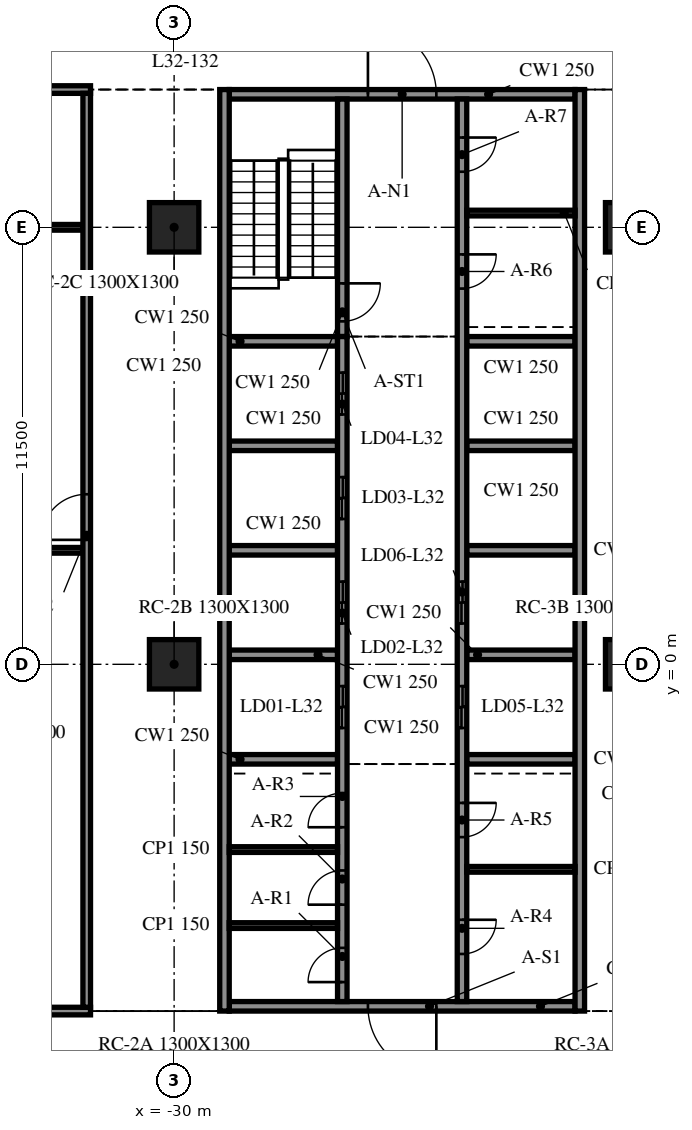
"""IFC4 building model, lengths in metres.
Left out: names, types, materials, properties, quantities, classifications, styles, units other than length and angle.
Written with IfcOpenShell. Run it as: python <this file> out.ifc"""

import sys

from ifc_helpers import new_model, si_unit, direction, frame, frame_2d, origin, origin_2d, place, context, subcontext, project, spatial, rectangle, extrude, element, fill, save


model = new_model("IFC4")
c1 = context("Model", 3, precision=1e-05, world=origin(), true_north=direction((0.0, 1.0)))
c2 = subcontext(c1, "Body", "Model", "MODEL_VIEW")
j1 = project(units=[si_unit("LENGTHUNIT", "METRE"), si_unit("PLANEANGLEUNIT", "RADIAN")], contexts=[c1])
p1 = place(None, origin())
s1 = spatial("IfcSite", under=j1, at=p1, CompositionType="ELEMENT")
p2 = place(p1, origin())
s2 = spatial("IfcBuilding", under=s1, at=p2, CompositionType="ELEMENT")
p3 = place(p2, frame((0.0, 0.0, 138.4)))
s3 = spatial("IfcBuildingStorey", under=s2, at=p3, CompositionType="ELEMENT", Elevation=138.4)
for number, where, z_axis, x_axis in (
    (1, (-30.0, 0.0, -0.34), (0.0, 0.0, 1.0), (1.0, 0.0, 0.0)),
    (2, (-30.0, 11.5, -0.34), (0.0, 0.0, 1.0), (1.0, 0.0, 0.0)),
    (3, (-18.0, 0.0, -0.34), (0.0, 0.0, 1.0), (1.0, 0.0, 0.0)),
    (4, (-18.0, 11.5, -0.34), (0.0, 0.0, 1.0), (1.0, 0.0, 0.0)),
):
    element("IfcColumn", number, at=place(p3, frame(where, z_axis=z_axis, x_axis=x_axis)), inside=s3, PredefinedType="COLUMN", context=c2, shape_type="SweptSolid", body=[
        extrude(rectangle(XDim=1.3, YDim=1.3, at=origin_2d()), origin(), (0.0, 0.0, 1.0), 4.1),
    ])
for number, where, z_axis, x_axis in (
    (5, (-28.675, 15.125, 0.0), (0.0, 0.0, 1.0), (0.0, -1.0, 0.0)),
    (6, (-19.325, -9.125, 0.0), (0.0, 0.0, 1.0), (0.0, 1.0, 0.0)),
):
    element("IfcWall", number, at=place(p3, frame(where, z_axis=z_axis, x_axis=x_axis)), inside=s3, PredefinedType="SOLIDWALL", context=c2, shape_type="SweptSolid", body=[
        extrude(rectangle(XDim=24.25, YDim=0.25, at=frame_2d((12.125, 0.0))), origin(), (0.0, 0.0, 1.0), 3.76),
    ])
p4 = place(p3, frame((-19.45, -9.0, 0.0), z_axis=(0.0, 0.0, 1.0), x_axis=(-1.0, 0.0, 0.0)))
e7 = element("IfcWall", 7, at=p4, inside=s3, PredefinedType="SOLIDWALL", context=c2, shape_type="SweptSolid", body=[
    extrude(rectangle(XDim=9.1, YDim=0.25, at=frame_2d((4.55, 0.0))), origin(), (0.0, 0.0, 1.0), 3.76),
])
p5 = place(p4, frame((3.65, 0.0, 0.0)))
e8 = element("IfcOpeningElement", 8, at=p5, cuts=e7, PredefinedType="OPENING", context=c2, shape_type="SweptSolid", body=[
    extrude(rectangle(XDim=1.8, YDim=2.1, at=frame_2d((0.9, 1.05))), frame((0.0, 0.135, 0.0), z_axis=(0.0, -1.0, 0.0), x_axis=(1.0, 0.0, 0.0)), (0.0, 0.0, 1.0), 0.27),
])
p6 = place(p3, frame((-28.55, 15.0, 0.0), z_axis=(0.0, 0.0, 1.0), x_axis=(1.0, 0.0, 0.0)))
e9 = element("IfcWall", 9, at=p6, inside=s3, PredefinedType="SOLIDWALL", context=c2, shape_type="SweptSolid", body=[
    extrude(rectangle(XDim=9.1, YDim=0.25, at=frame_2d((4.55, 0.0))), origin(), (0.0, 0.0, 1.0), 3.76),
])
p7 = place(p6, frame((3.65, 0.0, 0.0)))
e10 = element("IfcOpeningElement", 10, at=p7, cuts=e9, PredefinedType="OPENING", context=c2, shape_type="SweptSolid", body=[
    extrude(rectangle(XDim=1.8, YDim=2.1, at=frame_2d((0.9, 1.05))), frame((0.0, 0.135, 0.0), z_axis=(0.0, -1.0, 0.0), x_axis=(1.0, 0.0, 0.0)), (0.0, 0.0, 1.0), 0.27),
])
p8 = place(p3, frame((-25.575, -8.875, 0.0), z_axis=(0.0, 0.0, 1.0), x_axis=(0.0, 1.0, 0.0)))
e11 = element("IfcWall", 11, at=p8, inside=s3, PredefinedType="SOLIDWALL", context=c2, shape_type="SweptSolid", body=[
    extrude(rectangle(XDim=17.5, YDim=0.25, at=frame_2d((8.75, 0.0))), origin(), (0.0, 0.0, 1.0), 3.76),
])
p9 = place(p8, frame((7.2, 0.0, 0.0)))
e12 = element("IfcOpeningElement", 12, at=p9, cuts=e11, PredefinedType="OPENING", context=c2, shape_type="SweptSolid", body=[
    extrude(rectangle(XDim=1.1, YDim=2.1, at=frame_2d((0.55, 1.05))), frame((0.0, 0.135, 0.0), z_axis=(0.0, -1.0, 0.0), x_axis=(1.0, 0.0, 0.0)), (0.0, 0.0, 1.0), 0.27),
])
p10 = place(p8, frame((9.95, 0.0, 0.0)))
e13 = element("IfcOpeningElement", 13, at=p10, cuts=e11, PredefinedType="OPENING", context=c2, shape_type="SweptSolid", body=[
    extrude(rectangle(XDim=1.1, YDim=2.1, at=frame_2d((0.55, 1.05))), frame((0.0, 0.135, 0.0), z_axis=(0.0, -1.0, 0.0), x_axis=(1.0, 0.0, 0.0)), (0.0, 0.0, 1.0), 0.27),
])
p11 = place(p8, frame((12.7, 0.0, 0.0)))
e14 = element("IfcOpeningElement", 14, at=p11, cuts=e11, PredefinedType="OPENING", context=c2, shape_type="SweptSolid", body=[
    extrude(rectangle(XDim=1.1, YDim=2.1, at=frame_2d((0.55, 1.05))), frame((0.0, 0.135, 0.0), z_axis=(0.0, -1.0, 0.0), x_axis=(1.0, 0.0, 0.0)), (0.0, 0.0, 1.0), 0.27),
])
p12 = place(p8, frame((15.45, 0.0, 0.0)))
e15 = element("IfcOpeningElement", 15, at=p12, cuts=e11, PredefinedType="OPENING", context=c2, shape_type="SweptSolid", body=[
    extrude(rectangle(XDim=1.1, YDim=2.1, at=frame_2d((0.55, 1.05))), frame((0.0, 0.135, 0.0), z_axis=(0.0, -1.0, 0.0), x_axis=(1.0, 0.0, 0.0)), (0.0, 0.0, 1.0), 0.27),
])
p13 = place(p8, frame((0.512, 0.0, 0.0)))
e16 = element("IfcOpeningElement", 16, at=p13, cuts=e11, PredefinedType="OPENING", context=c2, shape_type="SweptSolid", body=[
    extrude(rectangle(XDim=0.9, YDim=2.1, at=frame_2d((0.45, 1.05))), frame((0.0, 0.135, 0.0), z_axis=(0.0, -1.0, 0.0), x_axis=(1.0, 0.0, 0.0)), (0.0, 0.0, 1.0), 0.27),
])
p14 = place(p8, frame((2.55, 0.0, 0.0)))
e17 = element("IfcOpeningElement", 17, at=p14, cuts=e11, PredefinedType="OPENING", context=c2, shape_type="SweptSolid", body=[
    extrude(rectangle(XDim=0.9, YDim=2.1, at=frame_2d((0.45, 1.05))), frame((0.0, 0.135, 0.0), z_axis=(0.0, -1.0, 0.0), x_axis=(1.0, 0.0, 0.0)), (0.0, 0.0, 1.0), 0.27),
])
p15 = place(p8, frame((4.587, 0.0, 0.0)))
e18 = element("IfcOpeningElement", 18, at=p15, cuts=e11, PredefinedType="OPENING", context=c2, shape_type="SweptSolid", body=[
    extrude(rectangle(XDim=0.9, YDim=2.1, at=frame_2d((0.45, 1.05))), frame((0.0, 0.135, 0.0), z_axis=(0.0, -1.0, 0.0), x_axis=(1.0, 0.0, 0.0)), (0.0, 0.0, 1.0), 0.27),
])
p16 = place(p3, frame((-25.575, 14.875, 0.0), z_axis=(0.0, 0.0, 1.0), x_axis=(0.0, -1.0, 0.0)))
e19 = element("IfcWall", 19, at=p16, inside=s3, PredefinedType="SOLIDWALL", context=c2, shape_type="SweptSolid", body=[
    extrude(rectangle(XDim=6.25, YDim=0.25, at=frame_2d((3.125, 0.0))), origin(), (0.0, 0.0, 1.0), 3.76),
])
p17 = place(p16, frame((4.85, 0.0, 0.0)))
e20 = element("IfcOpeningElement", 20, at=p17, cuts=e19, PredefinedType="OPENING", context=c2, shape_type="SweptSolid", body=[
    extrude(rectangle(XDim=1.0, YDim=2.1, at=frame_2d((0.5, 1.05))), frame((0.0, 0.135, 0.0), z_axis=(0.0, -1.0, 0.0), x_axis=(1.0, 0.0, 0.0)), (0.0, 0.0, 1.0), 0.27),
])
p18 = place(p3, frame((-22.425, 14.875, 0.0), z_axis=(0.0, 0.0, 1.0), x_axis=(0.0, -1.0, 0.0)))
e21 = element("IfcWall", 21, at=p18, inside=s3, PredefinedType="SOLIDWALL", context=c2, shape_type="SweptSolid", body=[
    extrude(rectangle(XDim=23.75, YDim=0.25, at=frame_2d((11.875, 0.0))), origin(), (0.0, 0.0, 1.0), 3.76),
])
p19 = place(p18, frame((15.45, 0.0, 0.0)))
e22 = element("IfcOpeningElement", 22, at=p19, cuts=e21, PredefinedType="OPENING", context=c2, shape_type="SweptSolid", body=[
    extrude(rectangle(XDim=1.1, YDim=2.1, at=frame_2d((0.55, 1.05))), frame((0.0, 0.135, 0.0), z_axis=(0.0, -1.0, 0.0), x_axis=(1.0, 0.0, 0.0)), (0.0, 0.0, 1.0), 0.27),
])
p20 = place(p18, frame((12.7, 0.0, 0.0)))
e23 = element("IfcOpeningElement", 23, at=p20, cuts=e21, PredefinedType="OPENING", context=c2, shape_type="SweptSolid", body=[
    extrude(rectangle(XDim=1.1, YDim=2.1, at=frame_2d((0.55, 1.05))), frame((0.0, 0.135, 0.0), z_axis=(0.0, -1.0, 0.0), x_axis=(1.0, 0.0, 0.0)), (0.0, 0.0, 1.0), 0.27),
])
p21 = place(p18, frame((21.597, 0.0, 0.0)))
e24 = element("IfcOpeningElement", 24, at=p21, cuts=e21, PredefinedType="OPENING", context=c2, shape_type="SweptSolid", body=[
    extrude(rectangle(XDim=0.9, YDim=2.1, at=frame_2d((0.45, 1.05))), frame((0.0, 0.135, 0.0), z_axis=(0.0, -1.0, 0.0), x_axis=(1.0, 0.0, 0.0)), (0.0, 0.0, 1.0), 0.27),
])
p22 = place(p18, frame((18.522, 0.0, 0.0)))
e25 = element("IfcOpeningElement", 25, at=p22, cuts=e21, PredefinedType="OPENING", context=c2, shape_type="SweptSolid", body=[
    extrude(rectangle(XDim=0.9, YDim=2.1, at=frame_2d((0.45, 1.05))), frame((0.0, 0.135, 0.0), z_axis=(0.0, -1.0, 0.0), x_axis=(1.0, 0.0, 0.0)), (0.0, 0.0, 1.0), 0.27),
])
p23 = place(p18, frame((4.087, 0.0, 0.0)))
e26 = element("IfcOpeningElement", 26, at=p23, cuts=e21, PredefinedType="OPENING", context=c2, shape_type="SweptSolid", body=[
    extrude(rectangle(XDim=0.9, YDim=2.1, at=frame_2d((0.45, 1.05))), frame((0.0, 0.135, 0.0), z_axis=(0.0, -1.0, 0.0), x_axis=(1.0, 0.0, 0.0)), (0.0, 0.0, 1.0), 0.27),
])
p24 = place(p18, frame((1.012, 0.0, 0.0)))
e27 = element("IfcOpeningElement", 27, at=p24, cuts=e21, PredefinedType="OPENING", context=c2, shape_type="SweptSolid", body=[
    extrude(rectangle(XDim=0.9, YDim=2.1, at=frame_2d((0.45, 1.05))), frame((0.0, 0.135, 0.0), z_axis=(0.0, -1.0, 0.0), x_axis=(1.0, 0.0, 0.0)), (0.0, 0.0, 1.0), 0.27),
])
for number, where, z_axis, x_axis in (
    (28, (-28.55, -2.5, 0.0), (0.0, 0.0, 1.0), (1.0, 0.0, 0.0)),
    (29, (-28.55, 0.25, 0.0), (0.0, 0.0, 1.0), (1.0, 0.0, 0.0)),
    (30, (-28.55, 3.0, 0.0), (0.0, 0.0, 1.0), (1.0, 0.0, 0.0)),
    (31, (-28.55, 5.75, 0.0), (0.0, 0.0, 1.0), (1.0, 0.0, 0.0)),
    (32, (-28.55, 8.5, 0.0), (0.0, 0.0, 1.0), (1.0, 0.0, 0.0)),
    (33, (-22.3, -2.5, 0.0), (0.0, 0.0, 1.0), (1.0, 0.0, 0.0)),
    (34, (-22.3, 0.25, 0.0), (0.0, 0.0, 1.0), (1.0, 0.0, 0.0)),
    (35, (-22.3, 3.0, 0.0), (0.0, 0.0, 1.0), (1.0, 0.0, 0.0)),
    (36, (-22.3, 5.75, 0.0), (0.0, 0.0, 1.0), (1.0, 0.0, 0.0)),
    (37, (-22.3, 8.5, 0.0), (0.0, 0.0, 1.0), (1.0, 0.0, 0.0)),
):
    element("IfcWall", number, at=place(p3, frame(where, z_axis=z_axis, x_axis=x_axis)), inside=s3, PredefinedType="SOLIDWALL", context=c2, shape_type="SweptSolid", body=[
        extrude(rectangle(XDim=2.85, YDim=0.25, at=frame_2d((1.425, 0.0))), origin(), (0.0, 0.0, 1.0), 3.76),
    ])
for number, where, z_axis, x_axis in (
    (38, (-28.55, -6.875, 0.0), (0.0, 0.0, 1.0), (1.0, 0.0, 0.0)),
    (39, (-28.55, -4.875, 0.0), (0.0, 0.0, 1.0), (1.0, 0.0, 0.0)),
    (40, (-22.3, -5.395, 0.0), (0.0, 0.0, 1.0), (1.0, 0.0, 0.0)),
    (41, (-22.3, 11.875, 0.0), (0.0, 0.0, 1.0), (1.0, 0.0, 0.0)),
):
    element("IfcWall", number, at=place(p3, frame(where, z_axis=z_axis, x_axis=x_axis)), inside=s3, PredefinedType="PARTITIONING", context=c2, shape_type="SweptSolid", body=[
        extrude(rectangle(XDim=2.85, YDim=0.15, at=frame_2d((1.425, 0.0))), origin(), (0.0, 0.0, 1.0), 3.76),
    ])
p25 = place(p3, frame((-47.85, -9.125, 0.0), z_axis=(0.0, 0.0, 1.0), x_axis=(1.0, 0.0, 0.0)))
e42 = element("IfcWall", 42, at=p25, inside=s3, PredefinedType="PARTITIONING", context=c2, shape_type="SweptSolid", body=[
    extrude(rectangle(XDim=15.65, YDim=0.2, at=frame_2d((7.825, 0.0))), origin(), (0.0, 0.0, 1.0), 3.76),
])
p26 = place(p25, frame((7.3, 0.0, 0.0)))
e43 = element("IfcOpeningElement", 43, at=p26, cuts=e42, PredefinedType="OPENING", context=c2, shape_type="SweptSolid", body=[
    extrude(rectangle(XDim=1.2, YDim=2.1, at=frame_2d((0.6, 1.05))), frame((0.0, 0.11, 0.0), z_axis=(0.0, -1.0, 0.0), x_axis=(1.0, 0.0, 0.0)), (0.0, 0.0, 1.0), 0.22),
])
p27 = place(p3, frame((-47.85, 3.0, 0.0), z_axis=(0.0, 0.0, 1.0), x_axis=(1.0, 0.0, 0.0)))
e44 = element("IfcWall", 44, at=p27, inside=s3, PredefinedType="PARTITIONING", context=c2, shape_type="SweptSolid", body=[
    extrude(rectangle(XDim=15.45, YDim=0.15, at=frame_2d((7.725, 0.0))), origin(), (0.0, 0.0, 1.0), 3.76),
])
p28 = place(p3, frame((-41.35, 11.5, 0.0), z_axis=(0.0, 0.0, 1.0), x_axis=(1.0, 0.0, 0.0)))
e45 = element("IfcWall", 45, at=p28, inside=s3, PredefinedType="PARTITIONING", context=c2, shape_type="SweptSolid", body=[
    extrude(rectangle(XDim=8.95, YDim=0.15, at=frame_2d((4.475, 0.0))), origin(), (0.0, 0.0, 1.0), 3.76),
])
p29 = place(p3, frame((-47.975, 15.125, 0.0), z_axis=(0.0, 0.0, 1.0), x_axis=(1.0, 0.0, 0.0)))
e46 = element("IfcWall", 46, at=p29, inside=s3, PredefinedType="PARTITIONING", context=c2, shape_type="SweptSolid", body=[
    extrude(rectangle(XDim=15.775, YDim=0.2, at=frame_2d((7.888, 0.0))), origin(), (0.0, 0.0, 1.0), 3.76),
])
p30 = place(p29, frame((7.3, 0.0, 0.0)))
e47 = element("IfcOpeningElement", 47, at=p30, cuts=e46, PredefinedType="OPENING", context=c2, shape_type="SweptSolid", body=[
    extrude(rectangle(XDim=1.2, YDim=2.1, at=frame_2d((0.6, 1.05))), frame((0.0, 0.11, 0.0), z_axis=(0.0, -1.0, 0.0), x_axis=(1.0, 0.0, 0.0)), (0.0, 0.0, 1.0), 0.22),
])
p31 = place(p3, frame((-32.3, -9.025, 0.0), z_axis=(0.0, 0.0, 1.0), x_axis=(0.0, 1.0, 0.0)))
e48 = element("IfcWall", 48, at=p31, inside=s3, PredefinedType="PARTITIONING", context=c2, shape_type="SweptSolid", body=[
    extrude(rectangle(XDim=24.05, YDim=0.2, at=frame_2d((12.025, 0.0))), origin(), (0.0, 0.0, 1.0), 3.76),
])
p32 = place(p31, frame((12.3, 0.0, 0.0)))
e49 = element("IfcOpeningElement", 49, at=p32, cuts=e48, PredefinedType="OPENING", context=c2, shape_type="SweptSolid", body=[
    extrude(rectangle(XDim=1.2, YDim=2.1, at=frame_2d((0.6, 1.05))), frame((0.0, 0.11, 0.0), z_axis=(0.0, -1.0, 0.0), x_axis=(1.0, 0.0, 0.0)), (0.0, 0.0, 1.0), 0.22),
])
p33 = place(p5, origin())
e50 = element("IfcDoor", 50, at=p33, inside=s3, OperationType="DOUBLE_DOOR_SINGLE_SWING", PredefinedType="DOOR", context=c2, shape_type="SweptSolid", body=[
    extrude(rectangle(XDim=1.8, YDim=2.1, at=frame_2d((0.9, 1.05))), frame((0.0, 0.025, 0.0), z_axis=(0.0, -1.0, 0.0), x_axis=(1.0, 0.0, 0.0)), (0.0, 0.0, 1.0), 0.05),
])
fill(e8, e50)
p34 = place(p7, origin())
e51 = element("IfcDoor", 51, at=p34, inside=s3, OperationType="DOUBLE_DOOR_SINGLE_SWING", PredefinedType="DOOR", context=c2, shape_type="SweptSolid", body=[
    extrude(rectangle(XDim=1.8, YDim=2.1, at=frame_2d((0.9, 1.05))), frame((0.0, 0.025, 0.0), z_axis=(0.0, -1.0, 0.0), x_axis=(1.0, 0.0, 0.0)), (0.0, 0.0, 1.0), 0.05),
])
fill(e10, e51)
p35 = place(p19, origin())
e52 = element("IfcDoor", 52, at=p35, inside=s3, OperationType="DOUBLE_DOOR_SLIDING", PredefinedType="DOOR", context=c2, shape_type="SweptSolid", body=[
    extrude(rectangle(XDim=1.1, YDim=2.1, at=frame_2d((0.55, 1.05))), frame((0.0, 0.025, 0.0), z_axis=(0.0, -1.0, 0.0), x_axis=(1.0, 0.0, 0.0)), (0.0, 0.0, 1.0), 0.05),
])
fill(e22, e52)
p36 = place(p20, origin())
e53 = element("IfcDoor", 53, at=p36, inside=s3, OperationType="DOUBLE_DOOR_SLIDING", PredefinedType="DOOR", context=c2, shape_type="SweptSolid", body=[
    extrude(rectangle(XDim=1.1, YDim=2.1, at=frame_2d((0.55, 1.05))), frame((0.0, 0.025, 0.0), z_axis=(0.0, -1.0, 0.0), x_axis=(1.0, 0.0, 0.0)), (0.0, 0.0, 1.0), 0.05),
])
fill(e23, e53)
p37 = place(p9, origin())
e54 = element("IfcDoor", 54, at=p37, inside=s3, OperationType="DOUBLE_DOOR_SLIDING", PredefinedType="DOOR", context=c2, shape_type="SweptSolid", body=[
    extrude(rectangle(XDim=1.1, YDim=2.1, at=frame_2d((0.55, 1.05))), frame((0.0, 0.025, 0.0), z_axis=(0.0, -1.0, 0.0), x_axis=(1.0, 0.0, 0.0)), (0.0, 0.0, 1.0), 0.05),
])
fill(e12, e54)
p38 = place(p10, origin())
e55 = element("IfcDoor", 55, at=p38, inside=s3, OperationType="DOUBLE_DOOR_SLIDING", PredefinedType="DOOR", context=c2, shape_type="SweptSolid", body=[
    extrude(rectangle(XDim=1.1, YDim=2.1, at=frame_2d((0.55, 1.05))), frame((0.0, 0.025, 0.0), z_axis=(0.0, -1.0, 0.0), x_axis=(1.0, 0.0, 0.0)), (0.0, 0.0, 1.0), 0.05),
])
fill(e13, e55)
p39 = place(p11, origin())
e56 = element("IfcDoor", 56, at=p39, inside=s3, OperationType="DOUBLE_DOOR_SLIDING", PredefinedType="DOOR", context=c2, shape_type="SweptSolid", body=[
    extrude(rectangle(XDim=1.1, YDim=2.1, at=frame_2d((0.55, 1.05))), frame((0.0, 0.025, 0.0), z_axis=(0.0, -1.0, 0.0), x_axis=(1.0, 0.0, 0.0)), (0.0, 0.0, 1.0), 0.05),
])
fill(e14, e56)
p40 = place(p12, origin())
e57 = element("IfcDoor", 57, at=p40, inside=s3, OperationType="DOUBLE_DOOR_SLIDING", PredefinedType="DOOR", context=c2, shape_type="SweptSolid", body=[
    extrude(rectangle(XDim=1.1, YDim=2.1, at=frame_2d((0.55, 1.05))), frame((0.0, 0.025, 0.0), z_axis=(0.0, -1.0, 0.0), x_axis=(1.0, 0.0, 0.0)), (0.0, 0.0, 1.0), 0.05),
])
fill(e15, e57)
p41 = place(p13, origin())
e58 = element("IfcDoor", 58, at=p41, inside=s3, OperationType="SINGLE_SWING_LEFT", PredefinedType="DOOR", context=c2, shape_type="SweptSolid", body=[
    extrude(rectangle(XDim=0.9, YDim=2.1, at=frame_2d((0.45, 1.05))), frame((0.0, 0.025, 0.0), z_axis=(0.0, -1.0, 0.0), x_axis=(1.0, 0.0, 0.0)), (0.0, 0.0, 1.0), 0.05),
])
fill(e16, e58)
p42 = place(p14, origin())
e59 = element("IfcDoor", 59, at=p42, inside=s3, OperationType="SINGLE_SWING_RIGHT", PredefinedType="DOOR", context=c2, shape_type="SweptSolid", body=[
    extrude(rectangle(XDim=0.9, YDim=2.1, at=frame_2d((0.45, 1.05))), frame((0.0, 0.025, 0.0), z_axis=(0.0, -1.0, 0.0), x_axis=(1.0, 0.0, 0.0)), (0.0, 0.0, 1.0), 0.05),
])
fill(e17, e59)
p43 = place(p15, origin())
e60 = element("IfcDoor", 60, at=p43, inside=s3, OperationType="SINGLE_SWING_LEFT", PredefinedType="DOOR", context=c2, shape_type="SweptSolid", body=[
    extrude(rectangle(XDim=0.9, YDim=2.1, at=frame_2d((0.45, 1.05))), frame((0.0, 0.025, 0.0), z_axis=(0.0, -1.0, 0.0), x_axis=(1.0, 0.0, 0.0)), (0.0, 0.0, 1.0), 0.05),
])
fill(e18, e60)
p44 = place(p21, origin())
e61 = element("IfcDoor", 61, at=p44, inside=s3, OperationType="SINGLE_SWING_RIGHT", PredefinedType="DOOR", context=c2, shape_type="SweptSolid", body=[
    extrude(rectangle(XDim=0.9, YDim=2.1, at=frame_2d((0.45, 1.05))), frame((0.0, 0.025, 0.0), z_axis=(0.0, -1.0, 0.0), x_axis=(1.0, 0.0, 0.0)), (0.0, 0.0, 1.0), 0.05),
])
fill(e24, e61)
p45 = place(p22, origin())
e62 = element("IfcDoor", 62, at=p45, inside=s3, OperationType="SINGLE_SWING_LEFT", PredefinedType="DOOR", context=c2, shape_type="SweptSolid", body=[
    extrude(rectangle(XDim=0.9, YDim=2.1, at=frame_2d((0.45, 1.05))), frame((0.0, 0.025, 0.0), z_axis=(0.0, -1.0, 0.0), x_axis=(1.0, 0.0, 0.0)), (0.0, 0.0, 1.0), 0.05),
])
fill(e25, e62)
p46 = place(p23, origin())
e63 = element("IfcDoor", 63, at=p46, inside=s3, OperationType="SINGLE_SWING_RIGHT", PredefinedType="DOOR", context=c2, shape_type="SweptSolid", body=[
    extrude(rectangle(XDim=0.9, YDim=2.1, at=frame_2d((0.45, 1.05))), frame((0.0, 0.025, 0.0), z_axis=(0.0, -1.0, 0.0), x_axis=(1.0, 0.0, 0.0)), (0.0, 0.0, 1.0), 0.05),
])
fill(e26, e63)
p47 = place(p24, origin())
e64 = element("IfcDoor", 64, at=p47, inside=s3, OperationType="SINGLE_SWING_LEFT", PredefinedType="DOOR", context=c2, shape_type="SweptSolid", body=[
    extrude(rectangle(XDim=0.9, YDim=2.1, at=frame_2d((0.45, 1.05))), frame((0.0, 0.025, 0.0), z_axis=(0.0, -1.0, 0.0), x_axis=(1.0, 0.0, 0.0)), (0.0, 0.0, 1.0), 0.05),
])
fill(e27, e64)
p48 = place(p17, origin())
e65 = element("IfcDoor", 65, at=p48, inside=s3, OperationType="SINGLE_SWING_RIGHT", PredefinedType="DOOR", context=c2, shape_type="SweptSolid", body=[
    extrude(rectangle(XDim=1.0, YDim=2.1, at=frame_2d((0.5, 1.05))), frame((0.0, 0.025, 0.0), z_axis=(0.0, -1.0, 0.0), x_axis=(1.0, 0.0, 0.0)), (0.0, 0.0, 1.0), 0.05),
])
fill(e20, e65)
p49 = place(p32, origin())
e66 = element("IfcDoor", 66, at=p49, inside=s3, OperationType="SINGLE_SWING_RIGHT", PredefinedType="DOOR", context=c2, shape_type="SweptSolid", body=[
    extrude(rectangle(XDim=1.2, YDim=2.1, at=frame_2d((0.6, 1.05))), frame((0.0, 0.025, 0.0), z_axis=(0.0, -1.0, 0.0), x_axis=(1.0, 0.0, 0.0)), (0.0, 0.0, 1.0), 0.05),
])
fill(e49, e66)
save(model, sys.argv[1])
